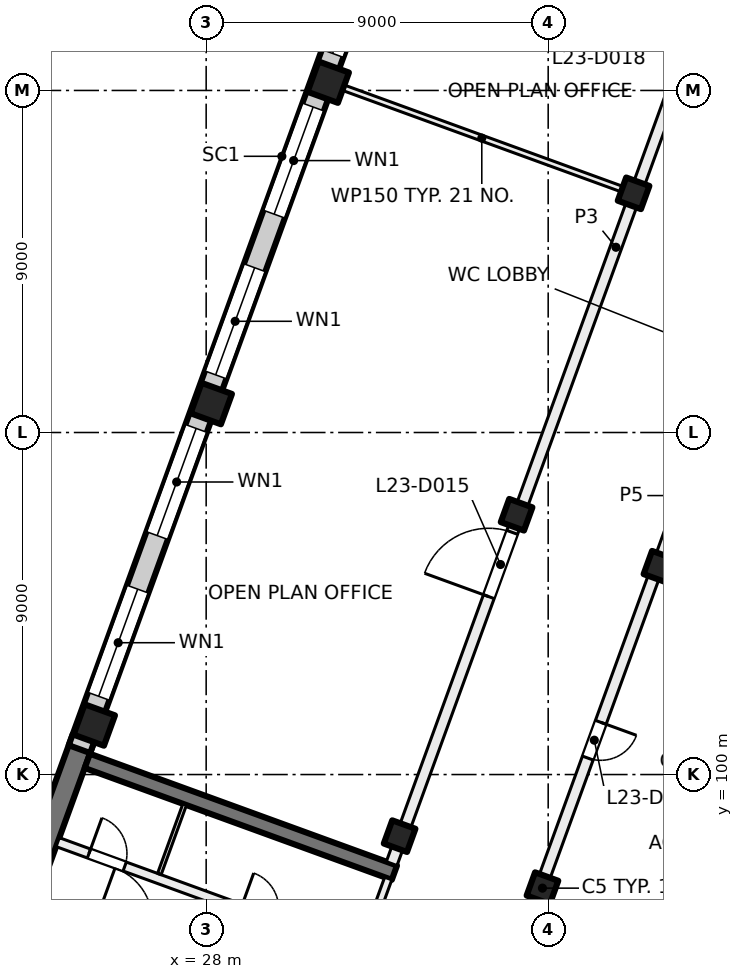
"""IFC4 building model, lengths in metres.
Left out: names, types, materials, properties, quantities, classifications, styles, units other than length and angle.
Written with IfcOpenShell. Run it as: python <this file> out.ifc"""

import sys

from ifc_helpers import new_model, si_unit, direction, frame, frame_2d, origin, origin_2d, place, context, subcontext, project, spatial, rectangle, extrude, element, fill, save


model = new_model("IFC4")
c1 = context("Model", 3, precision=1e-05, world=origin(), true_north=direction((0.0, 1.0)))
c2 = subcontext(c1, "Body", "Model", "MODEL_VIEW")
j1 = project(units=[si_unit("LENGTHUNIT", "METRE"), si_unit("PLANEANGLEUNIT", "RADIAN")], contexts=[c1])
p1 = place(None, origin())
s1 = spatial("IfcSite", under=j1, at=p1, CompositionType="ELEMENT")
p2 = place(p1, origin())
s2 = spatial("IfcBuilding", under=s1, at=p2, CompositionType="ELEMENT")
p3 = place(p2, frame((0.0, 0.0, 101.0)))
s3 = spatial("IfcBuildingStorey", under=s2, at=p3, CompositionType="ELEMENT", Elevation=101.0)
for number, where, z_axis, x_axis in (
    (1, (39.927, 105.468, 0.0), (0.0, 0.0, 1.0), (-0.342, -0.94, 0.0)),
    (2, (36.849, 97.011, 0.0), (0.0, 0.0, 1.0), (-0.342, -0.94, 0.0)),
    (3, (39.247, 115.293, 0.0), (0.0, 0.0, 1.0), (-0.342, -0.94, 0.0)),
    (4, (36.169, 106.836, 0.0), (0.0, 0.0, 1.0), (-0.342, -0.94, 0.0)),
    (5, (33.091, 98.379, 0.0), (0.0, 0.0, 1.0), (-0.342, -0.94, 0.0)),
):
    element("IfcColumn", number, at=place(p3, frame(where, z_axis=z_axis, x_axis=x_axis)), inside=s3, PredefinedType="COLUMN", context=c2, shape_type="SweptSolid", body=[
        extrude(rectangle(XDim=0.65, YDim=0.65, at=origin_2d()), origin(), (0.0, 0.0, 1.0), 4.0),
    ])
for number, where, z_axis, x_axis in (
    (6, (31.212, 118.218, 0.0), (0.0, 0.0, 1.0), (-0.342, -0.94, 0.0)),
    (7, (28.134, 109.76, 0.0), (0.0, 0.0, 1.0), (-0.342, -0.94, 0.0)),
    (8, (25.056, 101.303, 0.0), (0.0, 0.0, 1.0), (-0.342, -0.94, 0.0)),
):
    element("IfcColumn", number, at=place(p3, frame(where, z_axis=z_axis, x_axis=x_axis)), inside=s3, PredefinedType="COLUMN", context=c2, shape_type="SweptSolid", body=[
        extrude(rectangle(XDim=0.85, YDim=0.85, at=origin_2d()), origin(), (0.0, 0.0, 1.0), 4.0),
    ])
p4 = place(p3, frame((21.717, 92.568, 0.0), z_axis=(0.0, 0.0, 1.0), x_axis=(0.342017595281, 0.939693548195, 0.0)))
e9 = element("IfcWall", 9, at=p4, inside=s3, PredefinedType="SHEAR", context=c2, shape_type="SweptSolid", body=[
    extrude(rectangle(XDim=8.925, YDim=0.6, at=frame_2d((4.462, 0.0))), origin(), (0.0, 0.0, 1.0), 4.0),
])
p5 = place(p3, frame((32.953, 97.418, 0.0), z_axis=(0.0, 0.0, 1.0), x_axis=(-0.93969060187, 0.342025690201, 0.0)))
e10 = element("IfcWall", 10, at=p5, inside=s3, PredefinedType="SHEAR", context=c2, shape_type="SweptSolid", body=[
    extrude(rectangle(XDim=8.6, YDim=0.4, at=frame_2d((4.3, 0.0))), origin(), (0.0, 0.0, 1.0), 4.0),
])
p6 = place(p3, frame((24.666, 100.669, 0.0), z_axis=(0.0, 0.0, 1.0), x_axis=(0.34201964167, 0.939692803373, 0.0)))
e11 = element("IfcWall", 11, at=p6, inside=s3, PredefinedType="SOLIDWALL", context=c2, shape_type="SweptSolid", body=[
    extrude(rectangle(XDim=32.884, YDim=0.6, at=frame_2d((16.442, 0.0))), origin(), (0.0, 0.0, 1.0), 3.625),
])
p7 = place(p6, frame((1.48, 0.0, 0.9)))
e12 = element("IfcOpeningElement", 12, at=p7, cuts=e11, PredefinedType="OPENING", context=c2, shape_type="SweptSolid", body=[
    extrude(rectangle(XDim=3.0, YDim=2.4, at=frame_2d((1.5, 1.2))), frame((0.0, 0.31, 0.0), z_axis=(0.0, -1.0, 0.0), x_axis=(1.0, 0.0, 0.0)), (0.0, 0.0, 1.0), 0.62),
])
p8 = place(p6, frame((5.98, 0.0, 0.9)))
e13 = element("IfcOpeningElement", 13, at=p8, cuts=e11, PredefinedType="OPENING", context=c2, shape_type="SweptSolid", body=[
    extrude(rectangle(XDim=3.0, YDim=2.4, at=frame_2d((1.5, 1.2))), frame((0.0, 0.31, 0.0), z_axis=(0.0, -1.0, 0.0), x_axis=(1.0, 0.0, 0.0)), (0.0, 0.0, 1.0), 0.62),
])
p9 = place(p6, frame((10.48, 0.0, 0.9)))
e14 = element("IfcOpeningElement", 14, at=p9, cuts=e11, PredefinedType="OPENING", context=c2, shape_type="SweptSolid", body=[
    extrude(rectangle(XDim=3.0, YDim=2.4, at=frame_2d((1.5, 1.2))), frame((0.0, 0.31, 0.0), z_axis=(0.0, -1.0, 0.0), x_axis=(1.0, 0.0, 0.0)), (0.0, 0.0, 1.0), 0.62),
])
p10 = place(p6, frame((14.98, 0.0, 0.9)))
e15 = element("IfcOpeningElement", 15, at=p10, cuts=e11, PredefinedType="OPENING", context=c2, shape_type="SweptSolid", body=[
    extrude(rectangle(XDim=3.0, YDim=2.4, at=frame_2d((1.5, 1.2))), frame((0.0, 0.31, 0.0), z_axis=(0.0, -1.0, 0.0), x_axis=(1.0, 0.0, 0.0)), (0.0, 0.0, 1.0), 0.62),
])
p11 = place(p6, frame((19.48, 0.0, 0.9)))
e16 = element("IfcOpeningElement", 16, at=p11, cuts=e11, PredefinedType="OPENING", context=c2, shape_type="SweptSolid", body=[
    extrude(rectangle(XDim=3.0, YDim=2.4, at=frame_2d((1.5, 1.2))), frame((0.0, 0.31, 0.0), z_axis=(0.0, -1.0, 0.0), x_axis=(1.0, 0.0, 0.0)), (0.0, 0.0, 1.0), 0.62),
])
p12 = place(p6, frame((23.98, 0.0, 0.9)))
e17 = element("IfcOpeningElement", 17, at=p12, cuts=e11, PredefinedType="OPENING", context=c2, shape_type="SweptSolid", body=[
    extrude(rectangle(XDim=3.0, YDim=2.4, at=frame_2d((1.5, 1.2))), frame((0.0, 0.31, 0.0), z_axis=(0.0, -1.0, 0.0), x_axis=(1.0, 0.0, 0.0)), (0.0, 0.0, 1.0), 0.62),
])
p13 = place(p6, frame((28.48, 0.0, 0.9)))
e18 = element("IfcOpeningElement", 18, at=p13, cuts=e11, PredefinedType="OPENING", context=c2, shape_type="SweptSolid", body=[
    extrude(rectangle(XDim=3.0, YDim=2.4, at=frame_2d((1.5, 1.2))), frame((0.0, 0.31, 0.0), z_axis=(0.0, -1.0, 0.0), x_axis=(1.0, 0.0, 0.0)), (0.0, 0.0, 1.0), 0.62),
])
p14 = place(p3, frame((31.491, 93.693, 0.0), z_axis=(0.0, 0.0, 1.0), x_axis=(0.341995824804, 0.939701471648, 0.0)))
e19 = element("IfcWall", 19, at=p14, inside=s3, PredefinedType="PARTITIONING", context=c2, shape_type="SweptSolid", body=[
    extrude(rectangle(XDim=3.8, YDim=0.2, at=frame_2d((1.9, 0.0))), origin(), (0.0, 0.0, 1.0), 3.625),
])
p15 = place(p14, frame((0.3, 0.0, 0.0)))
e20 = element("IfcOpeningElement", 20, at=p15, cuts=e19, PredefinedType="OPENING", context=c2, shape_type="SweptSolid", body=[
    extrude(rectangle(XDim=1.2, YDim=2.1, at=frame_2d((0.6, 1.05))), frame((0.0, 0.11, 0.0), z_axis=(0.0, -1.0, 0.0), x_axis=(1.0, 0.0, 0.0)), (0.0, 0.0, 1.0), 0.22),
])
p16 = place(p3, frame((23.538, 96.694, 0.0), z_axis=(0.0, 0.0, 1.0), x_axis=(0.939691552312, -0.342023078919, 0.0)))
e21 = element("IfcWall", 21, at=p16, inside=s3, PredefinedType="PARTITIONING", context=c2, shape_type="SweptSolid", body=[
    extrude(rectangle(XDim=8.4, YDim=0.2, at=frame_2d((4.2, 0.0))), origin(), (0.0, 0.0, 1.0), 3.625),
])
p17 = place(p16, frame((1.65, 0.0, 0.0)))
e22 = element("IfcOpeningElement", 22, at=p17, cuts=e21, PredefinedType="OPENING", context=c2, shape_type="SweptSolid", body=[
    extrude(rectangle(XDim=1.5, YDim=2.1, at=frame_2d((0.75, 1.05))), frame((0.0, 0.11, 0.0), z_axis=(0.0, -1.0, 0.0), x_axis=(1.0, 0.0, 0.0)), (0.0, 0.0, 1.0), 0.22),
])
p18 = place(p3, frame((24.094, 98.221, 0.0), z_axis=(0.0, 0.0, 1.0), x_axis=(0.939691552312, -0.342023078919, 0.0)))
e23 = element("IfcWall", 23, at=p18, inside=s3, PredefinedType="PARTITIONING", context=c2, shape_type="SweptSolid", body=[
    extrude(rectangle(XDim=8.4, YDim=0.25, at=frame_2d((4.2, 0.0))), origin(), (0.0, 0.0, 1.0), 3.625),
])
p19 = place(p18, frame((5.125, 0.0, 0.0)))
e24 = element("IfcOpeningElement", 24, at=p19, cuts=e23, PredefinedType="OPENING", context=c2, shape_type="SweptSolid", body=[
    extrude(rectangle(XDim=1.0, YDim=2.1, at=frame_2d((0.5, 1.05))), frame((0.0, 0.135, 0.0), z_axis=(0.0, -1.0, 0.0), x_axis=(1.0, 0.0, 0.0)), (0.0, 0.0, 1.0), 0.27),
])
p20 = place(p18, frame((0.875, 0.0, 0.0)))
e25 = element("IfcOpeningElement", 25, at=p20, cuts=e23, PredefinedType="OPENING", context=c2, shape_type="SweptSolid", body=[
    extrude(rectangle(XDim=1.0, YDim=2.1, at=frame_2d((0.5, 1.05))), frame((0.0, 0.135, 0.0), z_axis=(0.0, -1.0, 0.0), x_axis=(1.0, 0.0, 0.0)), (0.0, 0.0, 1.0), 0.27),
])
p21 = place(p3, frame((26.768, 97.381, 0.0), z_axis=(0.0, 0.0, 1.0), x_axis=(0.342024501273, 0.939691034611, 0.0)))
e26 = element("IfcWall", 26, at=p21, inside=s3, PredefinedType="PARTITIONING", context=c2, shape_type="SweptSolid", body=[
    extrude(rectangle(XDim=1.95, YDim=0.1, at=frame_2d((0.975, 0.0))), origin(), (0.0, 0.0, 1.0), 3.625),
])
p22 = place(p3, frame((31.353, 118.166, 0.0), z_axis=(0.0, 0.0, 1.0), x_axis=(0.939687752599, -0.342033518263, 0.0)))
e27 = element("IfcWall", 27, at=p22, inside=s3, PredefinedType="PARTITIONING", context=c2, shape_type="SweptSolid", body=[
    extrude(rectangle(XDim=8.301, YDim=0.15, at=frame_2d((4.15, 0.0))), origin(), (0.0, 0.0, 1.0), 3.625),
])
p23 = place(p3, frame((32.881, 97.657, 0.0), z_axis=(0.0, 0.0, 1.0), x_axis=(0.342017360004, 0.939693633828, 0.0)))
e28 = element("IfcWall", 28, at=p23, inside=s3, PredefinedType="PARTITIONING", context=c2, shape_type="SweptSolid", body=[
    extrude(rectangle(XDim=34.516, YDim=0.3, at=frame_2d((17.258, 0.0))), origin(), (0.0, 0.0, 1.0), 3.625),
])
p24 = place(p23, frame((7.475, 0.0, 0.0)))
e29 = element("IfcOpeningElement", 29, at=p24, cuts=e28, PredefinedType="OPENING", context=c2, shape_type="SweptSolid", body=[
    extrude(rectangle(XDim=1.8, YDim=2.1, at=frame_2d((0.9, 1.05))), frame((0.0, 0.16, 0.0), z_axis=(0.0, -1.0, 0.0), x_axis=(1.0, 0.0, 0.0)), (0.0, 0.0, 1.0), 0.32),
])
p25 = place(p23, frame((25.0, 0.0, 0.0)))
e30 = element("IfcOpeningElement", 30, at=p25, cuts=e28, PredefinedType="OPENING", context=c2, shape_type="SweptSolid", body=[
    extrude(rectangle(XDim=1.0, YDim=2.1, at=frame_2d((0.5, 1.05))), frame((0.0, 0.16, 0.0), z_axis=(0.0, -1.0, 0.0), x_axis=(1.0, 0.0, 0.0)), (0.0, 0.0, 1.0), 0.32),
])
p26 = place(p23, frame((29.779, 0.0, 0.0)))
e31 = element("IfcOpeningElement", 31, at=p26, cuts=e28, PredefinedType="OPENING", context=c2, shape_type="SweptSolid", body=[
    extrude(rectangle(XDim=1.8, YDim=2.1, at=frame_2d((0.9, 1.05))), frame((0.0, 0.16, 0.0), z_axis=(0.0, -1.0, 0.0), x_axis=(1.0, 0.0, 0.0)), (0.0, 0.0, 1.0), 0.32),
])
p27 = place(p3, frame((40.021, 105.434, 0.0), z_axis=(0.0, 0.0, 1.0), x_axis=(0.939564838351, -0.342371018829, 0.0)))
e32 = element("IfcWall", 32, at=p27, inside=s3, PredefinedType="PARTITIONING", context=c2, shape_type="SweptSolid", body=[
    extrude(rectangle(XDim=2.591, YDim=0.125, at=frame_2d((1.295, 0.0))), origin(), (0.0, 0.0, 1.0), 3.625),
])
p28 = place(p3, frame((47.314, 125.909, 0.0), z_axis=(0.0, 0.0, 1.0), x_axis=(-0.342010770371, -0.939696032209, 0.0)))
e33 = element("IfcWall", 33, at=p28, inside=s3, PredefinedType="PARTITIONING", context=c2, shape_type="SweptSolid", body=[
    extrude(rectangle(XDim=31.485, YDim=0.3, at=frame_2d((15.742, 0.0))), origin(), (0.0, 0.0, 1.0), 3.625),
])
p29 = place(p28, frame((26.11, 0.0, 0.0)))
e34 = element("IfcOpeningElement", 34, at=p29, cuts=e33, PredefinedType="OPENING", context=c2, shape_type="SweptSolid", body=[
    extrude(rectangle(XDim=1.0, YDim=2.1, at=frame_2d((0.5, 1.05))), frame((0.0, 0.16, 0.0), z_axis=(0.0, -1.0, 0.0), x_axis=(1.0, 0.0, 0.0)), (0.0, 0.0, 1.0), 0.32),
])
p30 = place(p28, frame((15.485, 0.0, 0.0)))
e35 = element("IfcOpeningElement", 35, at=p30, cuts=e33, PredefinedType="OPENING", context=c2, shape_type="SweptSolid", body=[
    extrude(rectangle(XDim=1.0, YDim=2.1, at=frame_2d((0.5, 1.05))), frame((0.0, 0.16, 0.0), z_axis=(0.0, -1.0, 0.0), x_axis=(1.0, 0.0, 0.0)), (0.0, 0.0, 1.0), 0.32),
])
p31 = place(p28, frame((9.985, 0.0, 0.0)))
e36 = element("IfcOpeningElement", 36, at=p31, cuts=e33, PredefinedType="OPENING", context=c2, shape_type="SweptSolid", body=[
    extrude(rectangle(XDim=1.0, YDim=2.1, at=frame_2d((0.5, 1.05))), frame((0.0, 0.16, 0.0), z_axis=(0.0, -1.0, 0.0), x_axis=(1.0, 0.0, 0.0)), (0.0, 0.0, 1.0), 0.32),
])
p32 = place(p28, frame((5.484, 0.0, 0.0)))
e37 = element("IfcOpeningElement", 37, at=p32, cuts=e33, PredefinedType="OPENING", context=c2, shape_type="SweptSolid", body=[
    extrude(rectangle(XDim=1.0, YDim=2.1, at=frame_2d((0.5, 1.05))), frame((0.0, 0.16, 0.0), z_axis=(0.0, -1.0, 0.0), x_axis=(1.0, 0.0, 0.0)), (0.0, 0.0, 1.0), 0.32),
])
p33 = place(p7, origin())
e38 = element("IfcWindow", 38, at=p33, inside=s3, PartitioningType="SINGLE_PANEL", PredefinedType="WINDOW", context=c2, shape_type="SweptSolid", body=[
    extrude(rectangle(XDim=3.0, YDim=2.4, at=frame_2d((1.5, 1.2))), frame((0.0, 0.03, 0.0), z_axis=(0.0, -1.0, 0.0), x_axis=(1.0, 0.0, 0.0)), (0.0, 0.0, 1.0), 0.06),
])
fill(e12, e38)
p34 = place(p8, origin())
e39 = element("IfcWindow", 39, at=p34, inside=s3, PartitioningType="SINGLE_PANEL", PredefinedType="WINDOW", context=c2, shape_type="SweptSolid", body=[
    extrude(rectangle(XDim=3.0, YDim=2.4, at=frame_2d((1.5, 1.2))), frame((0.0, 0.03, 0.0), z_axis=(0.0, -1.0, 0.0), x_axis=(1.0, 0.0, 0.0)), (0.0, 0.0, 1.0), 0.06),
])
fill(e13, e39)
p35 = place(p9, origin())
e40 = element("IfcWindow", 40, at=p35, inside=s3, PartitioningType="SINGLE_PANEL", PredefinedType="WINDOW", context=c2, shape_type="SweptSolid", body=[
    extrude(rectangle(XDim=3.0, YDim=2.4, at=frame_2d((1.5, 1.2))), frame((0.0, 0.03, 0.0), z_axis=(0.0, -1.0, 0.0), x_axis=(1.0, 0.0, 0.0)), (0.0, 0.0, 1.0), 0.06),
])
fill(e14, e40)
p36 = place(p10, origin())
e41 = element("IfcWindow", 41, at=p36, inside=s3, PartitioningType="SINGLE_PANEL", PredefinedType="WINDOW", context=c2, shape_type="SweptSolid", body=[
    extrude(rectangle(XDim=3.0, YDim=2.4, at=frame_2d((1.5, 1.2))), frame((0.0, 0.03, 0.0), z_axis=(0.0, -1.0, 0.0), x_axis=(1.0, 0.0, 0.0)), (0.0, 0.0, 1.0), 0.06),
])
fill(e15, e41)
p37 = place(p11, origin())
e42 = element("IfcWindow", 42, at=p37, inside=s3, PartitioningType="SINGLE_PANEL", PredefinedType="WINDOW", context=c2, shape_type="SweptSolid", body=[
    extrude(rectangle(XDim=3.0, YDim=2.4, at=frame_2d((1.5, 1.2))), frame((0.0, 0.03, 0.0), z_axis=(0.0, -1.0, 0.0), x_axis=(1.0, 0.0, 0.0)), (0.0, 0.0, 1.0), 0.06),
])
fill(e16, e42)
p38 = place(p20, origin())
e43 = element("IfcDoor", 43, at=p38, inside=s3, OperationType="SINGLE_SWING_RIGHT", PredefinedType="DOOR", context=c2, shape_type="SweptSolid", body=[
    extrude(rectangle(XDim=1.0, YDim=2.1, at=frame_2d((0.5, 1.05))), frame((0.0, 0.025, 0.0), z_axis=(0.0, -1.0, 0.0), x_axis=(1.0, 0.0, 0.0)), (0.0, 0.0, 1.0), 0.05),
])
fill(e25, e43)
p39 = place(p24, origin())
e44 = element("IfcDoor", 44, at=p39, inside=s3, OperationType="DOUBLE_DOOR_SINGLE_SWING", PredefinedType="DOOR", context=c2, shape_type="SweptSolid", body=[
    extrude(rectangle(XDim=1.8, YDim=2.1, at=frame_2d((0.9, 1.05))), frame((0.0, 0.025, 0.0), z_axis=(0.0, -1.0, 0.0), x_axis=(1.0, 0.0, 0.0)), (0.0, 0.0, 1.0), 0.05),
])
fill(e29, e44)
p40 = place(p29, origin())
e45 = element("IfcDoor", 45, at=p40, inside=s3, OperationType="SINGLE_SWING_RIGHT", PredefinedType="DOOR", context=c2, shape_type="SweptSolid", body=[
    extrude(rectangle(XDim=1.0, YDim=2.1, at=frame_2d((0.5, 1.05))), frame((0.0, 0.025, 0.0), z_axis=(0.0, -1.0, 0.0), x_axis=(1.0, 0.0, 0.0)), (0.0, 0.0, 1.0), 0.05),
])
fill(e34, e45)
save(model, sys.argv[1])
